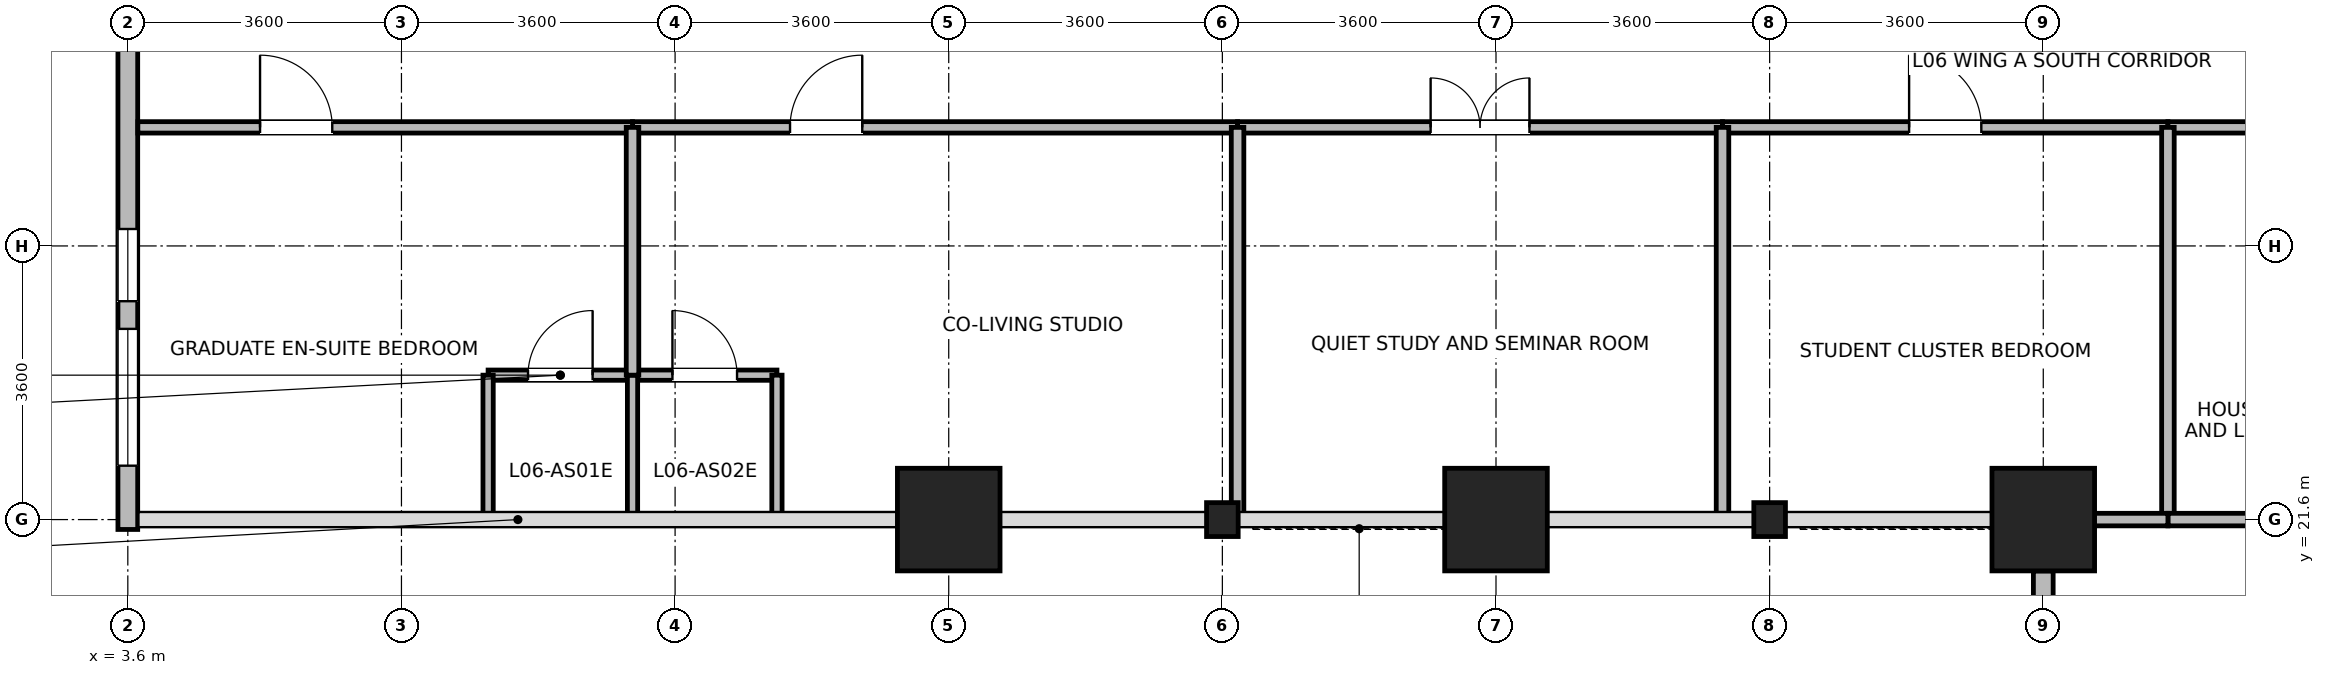
"""IFC4 building model, lengths in metres.
Left out: names, types, materials, properties, quantities, classifications, styles, units other than length and angle.
Written with IfcOpenShell. Run it as: python <this file> out.ifc"""

import sys

from ifc_helpers import new_model, si_unit, direction, frame, frame_2d, origin, origin_2d, place, context, subcontext, project, spatial, rectangle, i_section, extrude, source, transform, mapped, element, fill, save


model = new_model("IFC4")
c1 = context("Model", 3, precision=1e-05, world=origin(), true_north=direction((0.0, 1.0)))
c2 = subcontext(c1, "Body", "Model", "MODEL_VIEW")
j1 = project(units=[si_unit("LENGTHUNIT", "METRE"), si_unit("PLANEANGLEUNIT", "RADIAN")], contexts=[c1])
p1 = place(None, origin())
s1 = spatial("IfcSite", under=j1, at=p1, CompositionType="ELEMENT")
p2 = place(p1, origin())
s2 = spatial("IfcBuilding", under=s1, at=p2, CompositionType="ELEMENT")
p3 = place(p2, frame((0.0, 0.0, 29.0)))
s3 = spatial("IfcBuildingStorey", under=s2, at=p3, CompositionType="ELEMENT", Elevation=29.0)
m1 = source(origin(), c2, "Body", "SweptSolid", [
    extrude(rectangle(XDim=1.35, YDim=1.35, at=origin_2d()), origin(), (0.0, 0.0, 1.0), 3.7),
])
for number, where, z_axis, x_axis in (
    (1, (14.4, 21.6, 0.0), (0.0, 0.0, 1.0), (1.0, 0.0, 0.0)),
    (2, (21.6, 21.6, 0.0), (0.0, 0.0, 1.0), (1.0, 0.0, 0.0)),
    (3, (28.8, 21.6, 0.0), (0.0, 0.0, 1.0), (1.0, 0.0, 0.0)),
):
    element("IfcColumn", number, at=place(p3, frame(where, z_axis=z_axis, x_axis=x_axis)), inside=s3, PredefinedType="COLUMN", context=c2, shape_type="MappedRepresentation", body=[
        mapped(m1, transform((0.0, 0.0, 0.0), x_axis=(1.0, 0.0, 0.0), y_axis=(0.0, 1.0, 0.0), z_axis=(0.0, 0.0, 1.0), scale=1.0)),
    ])
m2 = source(origin(), c2, "Body", "SweptSolid", [
    extrude(i_section(OverallWidth=0.416, OverallDepth=0.446, WebThickness=0.029, FlangeThickness=0.04, FilletRadius=0.015, at=origin_2d()), origin(), (0.0, 0.0, 1.0), 3.7),
])
for number, where, z_axis, x_axis in (
    (4, (18.0, 21.6, 0.0), (0.0, 0.0, 1.0), (1.0, 0.0, 0.0)),
    (5, (25.2, 21.6, 0.0), (0.0, 0.0, 1.0), (1.0, 0.0, 0.0)),
):
    element("IfcColumn", number, at=place(p3, frame(where, z_axis=z_axis, x_axis=x_axis)), inside=s3, PredefinedType="COLUMN", context=c2, shape_type="MappedRepresentation", body=[
        mapped(m2, transform((0.0, 0.0, 0.0), x_axis=(1.0, 0.0, 0.0), y_axis=(0.0, 1.0, 0.0), z_axis=(0.0, 0.0, 1.0), scale=1.0)),
    ])
p4 = place(p3, frame((3.6, 21.47, 0.0), z_axis=(0.0, 0.0, 1.0), x_axis=(0.0, 1.0, 0.0)))
e6 = element("IfcWall", 6, at=p4, inside=s3, PredefinedType="STANDARD", context=c2, shape_type="SweptSolid", body=[
    extrude(rectangle(XDim=6.956, YDim=0.26, at=frame_2d((3.478, 0.0))), origin(), (0.0, 0.0, 1.0), 3.43),
])
p5 = place(p4, frame((0.839, 0.0, 0.85)))
e7 = element("IfcOpeningElement", 7, at=p5, cuts=e6, PredefinedType="OPENING", context=c2, shape_type="SweptSolid", body=[
    extrude(rectangle(XDim=1.8, YDim=1.85, at=frame_2d((0.9, 0.925))), frame((0.0, 0.14, 0.0), z_axis=(0.0, -1.0, 0.0), x_axis=(1.0, 0.0, 0.0)), (0.0, 0.0, 1.0), 0.28),
])
p6 = place(p4, frame((3.003, 0.0, 0.85)))
e8 = element("IfcOpeningElement", 8, at=p6, cuts=e6, PredefinedType="OPENING", context=c2, shape_type="SweptSolid", body=[
    extrude(rectangle(XDim=0.95, YDim=1.75, at=frame_2d((0.475, 0.875))), frame((0.0, 0.14, 0.0), z_axis=(0.0, -1.0, 0.0), x_axis=(1.0, 0.0, 0.0)), (0.0, 0.0, 1.0), 0.28),
])
p7 = place(p3, frame((28.8, 1.67, 0.0), z_axis=(0.0, 0.0, 1.0), x_axis=(0.0, 1.0, 0.0)))
e9 = element("IfcWall", 9, at=p7, inside=s3, PredefinedType="STANDARD", context=c2, shape_type="SweptSolid", body=[
    extrude(rectangle(XDim=19.254, YDim=0.26, at=frame_2d((9.627, 0.0))), origin(), (0.0, 0.0, 1.0), 3.43),
])
p8 = place(p7, frame((0.705, 0.0, 0.85)))
e10 = element("IfcOpeningElement", 10, at=p8, cuts=e9, PredefinedType="OPENING", context=c2, shape_type="SweptSolid", body=[
    extrude(rectangle(XDim=1.8, YDim=1.85, at=frame_2d((0.9, 0.925))), frame((0.0, 0.14, 0.0), z_axis=(0.0, -1.0, 0.0), x_axis=(1.0, 0.0, 0.0)), (0.0, 0.0, 1.0), 0.28),
])
p9 = place(p7, frame((7.123, 0.0, 0.85)))
e11 = element("IfcOpeningElement", 11, at=p9, cuts=e9, PredefinedType="OPENING", context=c2, shape_type="SweptSolid", body=[
    extrude(rectangle(XDim=1.8, YDim=1.85, at=frame_2d((0.9, 0.925))), frame((0.0, 0.14, 0.0), z_axis=(0.0, -1.0, 0.0), x_axis=(1.0, 0.0, 0.0)), (0.0, 0.0, 1.0), 0.28),
])
p10 = place(p7, frame((10.332, 0.0, 0.85)))
e12 = element("IfcOpeningElement", 12, at=p10, cuts=e9, PredefinedType="OPENING", context=c2, shape_type="SweptSolid", body=[
    extrude(rectangle(XDim=1.8, YDim=1.85, at=frame_2d((0.9, 0.925))), frame((0.0, 0.14, 0.0), z_axis=(0.0, -1.0, 0.0), x_axis=(1.0, 0.0, 0.0)), (0.0, 0.0, 1.0), 0.28),
])
p11 = place(p7, frame((13.541, 0.0, 0.85)))
e13 = element("IfcOpeningElement", 13, at=p11, cuts=e9, PredefinedType="OPENING", context=c2, shape_type="SweptSolid", body=[
    extrude(rectangle(XDim=1.8, YDim=1.85, at=frame_2d((0.9, 0.925))), frame((0.0, 0.14, 0.0), z_axis=(0.0, -1.0, 0.0), x_axis=(1.0, 0.0, 0.0)), (0.0, 0.0, 1.0), 0.28),
])
p12 = place(p7, frame((16.75, 0.0, 0.85)))
e14 = element("IfcOpeningElement", 14, at=p12, cuts=e9, PredefinedType="OPENING", context=c2, shape_type="SweptSolid", body=[
    extrude(rectangle(XDim=1.8, YDim=1.85, at=frame_2d((0.9, 0.925))), frame((0.0, 0.14, 0.0), z_axis=(0.0, -1.0, 0.0), x_axis=(1.0, 0.0, 0.0)), (0.0, 0.0, 1.0), 0.28),
])
p13 = place(p3, frame((8.34, 23.5, 0.0), z_axis=(0.0, 0.0, 1.0), x_axis=(1.0, 0.0, 0.0)))
e15 = element("IfcWall", 15, at=p13, inside=s3, PredefinedType="PARTITIONING", context=c2, shape_type="SweptSolid", body=[
    extrude(rectangle(XDim=1.9, YDim=0.135, at=frame_2d((0.95, 0.0))), origin(), (0.0, 0.0, 1.0), 3.43),
])
p14 = place(p13, frame((0.525, 0.0, 0.0)))
e16 = element("IfcOpeningElement", 16, at=p14, cuts=e15, PredefinedType="OPENING", context=c2, shape_type="SweptSolid", body=[
    extrude(rectangle(XDim=0.85, YDim=2.04, at=frame_2d((0.425, 1.02))), frame((0.0, 0.078, 0.0), z_axis=(0.0, -1.0, 0.0), x_axis=(1.0, 0.0, 0.0)), (0.0, 0.0, 1.0), 0.155),
])
p15 = place(p3, frame((10.24, 23.5, 0.0), z_axis=(0.0, 0.0, 1.0), x_axis=(1.0, 0.0, 0.0)))
e17 = element("IfcWall", 17, at=p15, inside=s3, PredefinedType="PARTITIONING", context=c2, shape_type="SweptSolid", body=[
    extrude(rectangle(XDim=1.9, YDim=0.135, at=frame_2d((0.95, 0.0))), origin(), (0.0, 0.0, 1.0), 3.43),
])
p16 = place(p15, frame((0.525, 0.0, 0.0)))
e18 = element("IfcOpeningElement", 18, at=p16, cuts=e17, PredefinedType="OPENING", context=c2, shape_type="SweptSolid", body=[
    extrude(rectangle(XDim=0.85, YDim=2.04, at=frame_2d((0.425, 1.02))), frame((0.0, 0.078, 0.0), z_axis=(0.0, -1.0, 0.0), x_axis=(1.0, 0.0, 0.0)), (0.0, 0.0, 1.0), 0.155),
])
for number, where, z_axis, x_axis in (
    (19, (8.34, 21.62, 0.0), (0.0, 0.0, 1.0), (0.0, 1.0, 0.0)),
    (20, (10.24, 21.62, 0.0), (0.0, 0.0, 1.0), (0.0, 1.0, 0.0)),
    (21, (12.14, 21.62, 0.0), (0.0, 0.0, 1.0), (0.0, 1.0, 0.0)),
):
    element("IfcWall", number, at=place(p3, frame(where, z_axis=z_axis, x_axis=x_axis)), inside=s3, PredefinedType="PARTITIONING", context=c2, shape_type="SweptSolid", body=[
        extrude(rectangle(XDim=1.88, YDim=0.135, at=frame_2d((0.94, 0.0))), origin(), (0.0, 0.0, 1.0), 3.43),
    ])
p17 = place(p3, frame((10.24, 26.76, 0.0), z_axis=(0.0, 0.0, 1.0), x_axis=(1.0, 0.0, 0.0)))
e22 = element("IfcWall", 22, at=p17, inside=s3, PredefinedType="PARTITIONING", context=c2, shape_type="SweptSolid", body=[
    extrude(rectangle(XDim=7.96, YDim=0.15, at=frame_2d((3.98, 0.0))), origin(), (0.0, 0.0, 1.0), 3.43),
])
p18 = place(p17, frame((2.072, 0.0, 0.0)))
e23 = element("IfcOpeningElement", 23, at=p18, cuts=e22, PredefinedType="OPENING", context=c2, shape_type="SweptSolid", body=[
    extrude(rectangle(XDim=0.95, YDim=2.1, at=frame_2d((0.475, 1.05))), frame((0.0, 0.085, 0.0), z_axis=(0.0, -1.0, 0.0), x_axis=(1.0, 0.0, 0.0)), (0.0, 0.0, 1.0), 0.17),
])
p19 = place(p3, frame((3.732, 26.76, 0.0), z_axis=(0.0, 0.0, 1.0), x_axis=(1.0, 0.0, 0.0)))
e24 = element("IfcWall", 24, at=p19, inside=s3, PredefinedType="PARTITIONING", context=c2, shape_type="SweptSolid", body=[
    extrude(rectangle(XDim=6.508, YDim=0.15, at=frame_2d((3.254, 0.0))), origin(), (0.0, 0.0, 1.0), 3.43),
])
p20 = place(p19, frame((1.608, 0.0, 0.0)))
e25 = element("IfcOpeningElement", 25, at=p20, cuts=e24, PredefinedType="OPENING", context=c2, shape_type="SweptSolid", body=[
    extrude(rectangle(XDim=0.95, YDim=2.1, at=frame_2d((0.475, 1.05))), frame((0.0, 0.085, 0.0), z_axis=(0.0, -1.0, 0.0), x_axis=(1.0, 0.0, 0.0)), (0.0, 0.0, 1.0), 0.17),
])
p21 = place(p3, frame((18.2, 26.76, 0.0), z_axis=(0.0, 0.0, 1.0), x_axis=(1.0, 0.0, 0.0)))
e26 = element("IfcWall", 26, at=p21, inside=s3, PredefinedType="PARTITIONING", context=c2, shape_type="SweptSolid", body=[
    extrude(rectangle(XDim=6.38, YDim=0.15, at=frame_2d((3.19, 0.0))), origin(), (0.0, 0.0, 1.0), 3.43),
])
p22 = place(p21, frame((2.54, 0.0, 0.0)))
e27 = element("IfcOpeningElement", 27, at=p22, cuts=e26, PredefinedType="OPENING", context=c2, shape_type="SweptSolid", body=[
    extrude(rectangle(XDim=1.3, YDim=2.12, at=frame_2d((0.65, 1.06))), frame((0.0, 0.085, 0.0), z_axis=(0.0, -1.0, 0.0), x_axis=(1.0, 0.0, 0.0)), (0.0, 0.0, 1.0), 0.17),
])
p23 = place(p3, frame((24.58, 26.76, 0.0), z_axis=(0.0, 0.0, 1.0), x_axis=(1.0, 0.0, 0.0)))
e28 = element("IfcWall", 28, at=p23, inside=s3, PredefinedType="PARTITIONING", context=c2, shape_type="SweptSolid", body=[
    extrude(rectangle(XDim=5.86, YDim=0.15, at=frame_2d((2.93, 0.0))), origin(), (0.0, 0.0, 1.0), 3.43),
])
p24 = place(p23, frame((2.455, 0.0, 0.0)))
e29 = element("IfcOpeningElement", 29, at=p24, cuts=e28, PredefinedType="OPENING", context=c2, shape_type="SweptSolid", body=[
    extrude(rectangle(XDim=0.95, YDim=2.1, at=frame_2d((0.475, 1.05))), frame((0.0, 0.085, 0.0), z_axis=(0.0, -1.0, 0.0), x_axis=(1.0, 0.0, 0.0)), (0.0, 0.0, 1.0), 0.17),
])
p25 = place(p3, frame((30.44, 26.76, 0.0), z_axis=(0.0, 0.0, 1.0), x_axis=(1.0, 0.0, 0.0)))
e30 = element("IfcWall", 30, at=p25, inside=s3, PredefinedType="PARTITIONING", context=c2, shape_type="SweptSolid", body=[
    extrude(rectangle(XDim=2.92, YDim=0.15, at=frame_2d((1.46, 0.0))), origin(), (0.0, 0.0, 1.0), 3.43),
])
p26 = place(p3, frame((18.2, 21.62, 0.0), z_axis=(0.0, 0.0, 1.0), x_axis=(0.0, 1.0, 0.0)))
e31 = element("IfcWall", 31, at=p26, inside=s3, PredefinedType="PARTITIONING", context=c2, shape_type="SweptSolid", body=[
    extrude(rectangle(XDim=5.14, YDim=0.165, at=frame_2d((2.57, 0.0))), origin(), (0.0, 0.0, 1.0), 3.07),
])
p27 = place(p3, frame((24.58, 21.62, 0.0), z_axis=(0.0, 0.0, 1.0), x_axis=(0.0, 1.0, 0.0)))
e32 = element("IfcWall", 32, at=p27, inside=s3, PredefinedType="PARTITIONING", context=c2, shape_type="SweptSolid", body=[
    extrude(rectangle(XDim=5.14, YDim=0.165, at=frame_2d((2.57, 0.0))), origin(), (0.0, 0.0, 1.0), 3.43),
])
p28 = place(p3, frame((30.44, 21.6, 0.0), z_axis=(0.0, 0.0, 1.0), x_axis=(0.0, 1.0, 0.0)))
e33 = element("IfcWall", 33, at=p28, inside=s3, PredefinedType="PARTITIONING", context=c2, shape_type="SweptSolid", body=[
    extrude(rectangle(XDim=5.16, YDim=0.165, at=frame_2d((2.58, 0.0))), origin(), (0.0, 0.0, 1.0), 3.43),
])
p29 = place(p3, frame((10.24, 23.5, 0.0), z_axis=(0.0, 0.0, 1.0), x_axis=(0.0, 1.0, 0.0)))
e34 = element("IfcWall", 34, at=p29, inside=s3, PredefinedType="PARTITIONING", context=c2, shape_type="SweptSolid", body=[
    extrude(rectangle(XDim=3.26, YDim=0.165, at=frame_2d((1.63, 0.0))), origin(), (0.0, 0.0, 1.0), 3.43),
])
p30 = place(p3, frame((30.44, 21.6, 0.0), z_axis=(0.0, 0.0, 1.0), x_axis=(1.0, 0.0, 0.0)))
e35 = element("IfcWall", 35, at=p30, inside=s3, PredefinedType="PARTITIONING", context=c2, shape_type="SweptSolid", body=[
    extrude(rectangle(XDim=2.92, YDim=0.165, at=frame_2d((1.46, 0.0))), origin(), (0.0, 0.0, 1.0), 2.93),
])
p31 = place(p3, frame((28.932, 21.6, 0.0), z_axis=(0.0, 0.0, 1.0), x_axis=(1.0, 0.0, 0.0)))
e36 = element("IfcWall", 36, at=p31, inside=s3, PredefinedType="PARTITIONING", context=c2, shape_type="SweptSolid", body=[
    extrude(rectangle(XDim=1.508, YDim=0.165, at=frame_2d((0.754, 0.0))), origin(), (0.0, 0.0, 1.0), 2.93),
])
p32 = place(p5, origin())
e37 = element("IfcWindow", 37, at=p32, inside=s3, PartitioningType="SINGLE_PANEL", PredefinedType="WINDOW", context=c2, shape_type="SweptSolid", body=[
    extrude(rectangle(XDim=1.8, YDim=1.85, at=frame_2d((0.9, 0.925))), frame((0.0, 0.03, 0.0), z_axis=(0.0, -1.0, 0.0), x_axis=(1.0, 0.0, 0.0)), (0.0, 0.0, 1.0), 0.06),
])
fill(e7, e37)
p33 = place(p6, origin())
e38 = element("IfcWindow", 38, at=p33, inside=s3, PartitioningType="SINGLE_PANEL", PredefinedType="WINDOW", context=c2, shape_type="SweptSolid", body=[
    extrude(rectangle(XDim=0.95, YDim=1.75, at=frame_2d((0.475, 0.875))), frame((0.0, 0.03, 0.0), z_axis=(0.0, -1.0, 0.0), x_axis=(1.0, 0.0, 0.0)), (0.0, 0.0, 1.0), 0.06),
])
fill(e8, e38)
p34 = place(p14, origin())
e39 = element("IfcDoor", 39, at=p34, inside=s3, OperationType="SINGLE_SWING_RIGHT", PredefinedType="DOOR", context=c2, shape_type="SweptSolid", body=[
    extrude(rectangle(XDim=0.85, YDim=2.04, at=frame_2d((0.425, 1.02))), frame((0.0, 0.025, 0.0), z_axis=(0.0, -1.0, 0.0), x_axis=(1.0, 0.0, 0.0)), (0.0, 0.0, 1.0), 0.05),
])
fill(e16, e39)
p35 = place(p16, origin())
e40 = element("IfcDoor", 40, at=p35, inside=s3, OperationType="SINGLE_SWING_LEFT", PredefinedType="DOOR", context=c2, shape_type="SweptSolid", body=[
    extrude(rectangle(XDim=0.85, YDim=2.04, at=frame_2d((0.425, 1.02))), frame((0.0, 0.025, 0.0), z_axis=(0.0, -1.0, 0.0), x_axis=(1.0, 0.0, 0.0)), (0.0, 0.0, 1.0), 0.05),
])
fill(e18, e40)
p36 = place(p18, origin())
e41 = element("IfcDoor", 41, at=p36, inside=s3, OperationType="SINGLE_SWING_RIGHT", PredefinedType="DOOR", context=c2, shape_type="SweptSolid", body=[
    extrude(rectangle(XDim=0.95, YDim=2.1, at=frame_2d((0.475, 1.05))), frame((0.0, 0.025, 0.0), z_axis=(0.0, -1.0, 0.0), x_axis=(1.0, 0.0, 0.0)), (0.0, 0.0, 1.0), 0.05),
])
fill(e23, e41)
p37 = place(p20, origin())
e42 = element("IfcDoor", 42, at=p37, inside=s3, OperationType="SINGLE_SWING_LEFT", PredefinedType="DOOR", context=c2, shape_type="SweptSolid", body=[
    extrude(rectangle(XDim=0.95, YDim=2.1, at=frame_2d((0.475, 1.05))), frame((0.0, 0.025, 0.0), z_axis=(0.0, -1.0, 0.0), x_axis=(1.0, 0.0, 0.0)), (0.0, 0.0, 1.0), 0.05),
])
fill(e25, e42)
p38 = place(p22, origin())
e43 = element("IfcDoor", 43, at=p38, inside=s3, OperationType="DOUBLE_DOOR_SINGLE_SWING", PredefinedType="DOOR", context=c2, shape_type="SweptSolid", body=[
    extrude(rectangle(XDim=1.3, YDim=2.12, at=frame_2d((0.65, 1.06))), frame((0.0, 0.025, 0.0), z_axis=(0.0, -1.0, 0.0), x_axis=(1.0, 0.0, 0.0)), (0.0, 0.0, 1.0), 0.05),
])
fill(e27, e43)
p39 = place(p24, origin())
e44 = element("IfcDoor", 44, at=p39, inside=s3, OperationType="SINGLE_SWING_LEFT", PredefinedType="DOOR", context=c2, shape_type="SweptSolid", body=[
    extrude(rectangle(XDim=0.95, YDim=2.1, at=frame_2d((0.475, 1.05))), frame((0.0, 0.025, 0.0), z_axis=(0.0, -1.0, 0.0), x_axis=(1.0, 0.0, 0.0)), (0.0, 0.0, 1.0), 0.05),
])
fill(e29, e44)
save(model, sys.argv[1])
